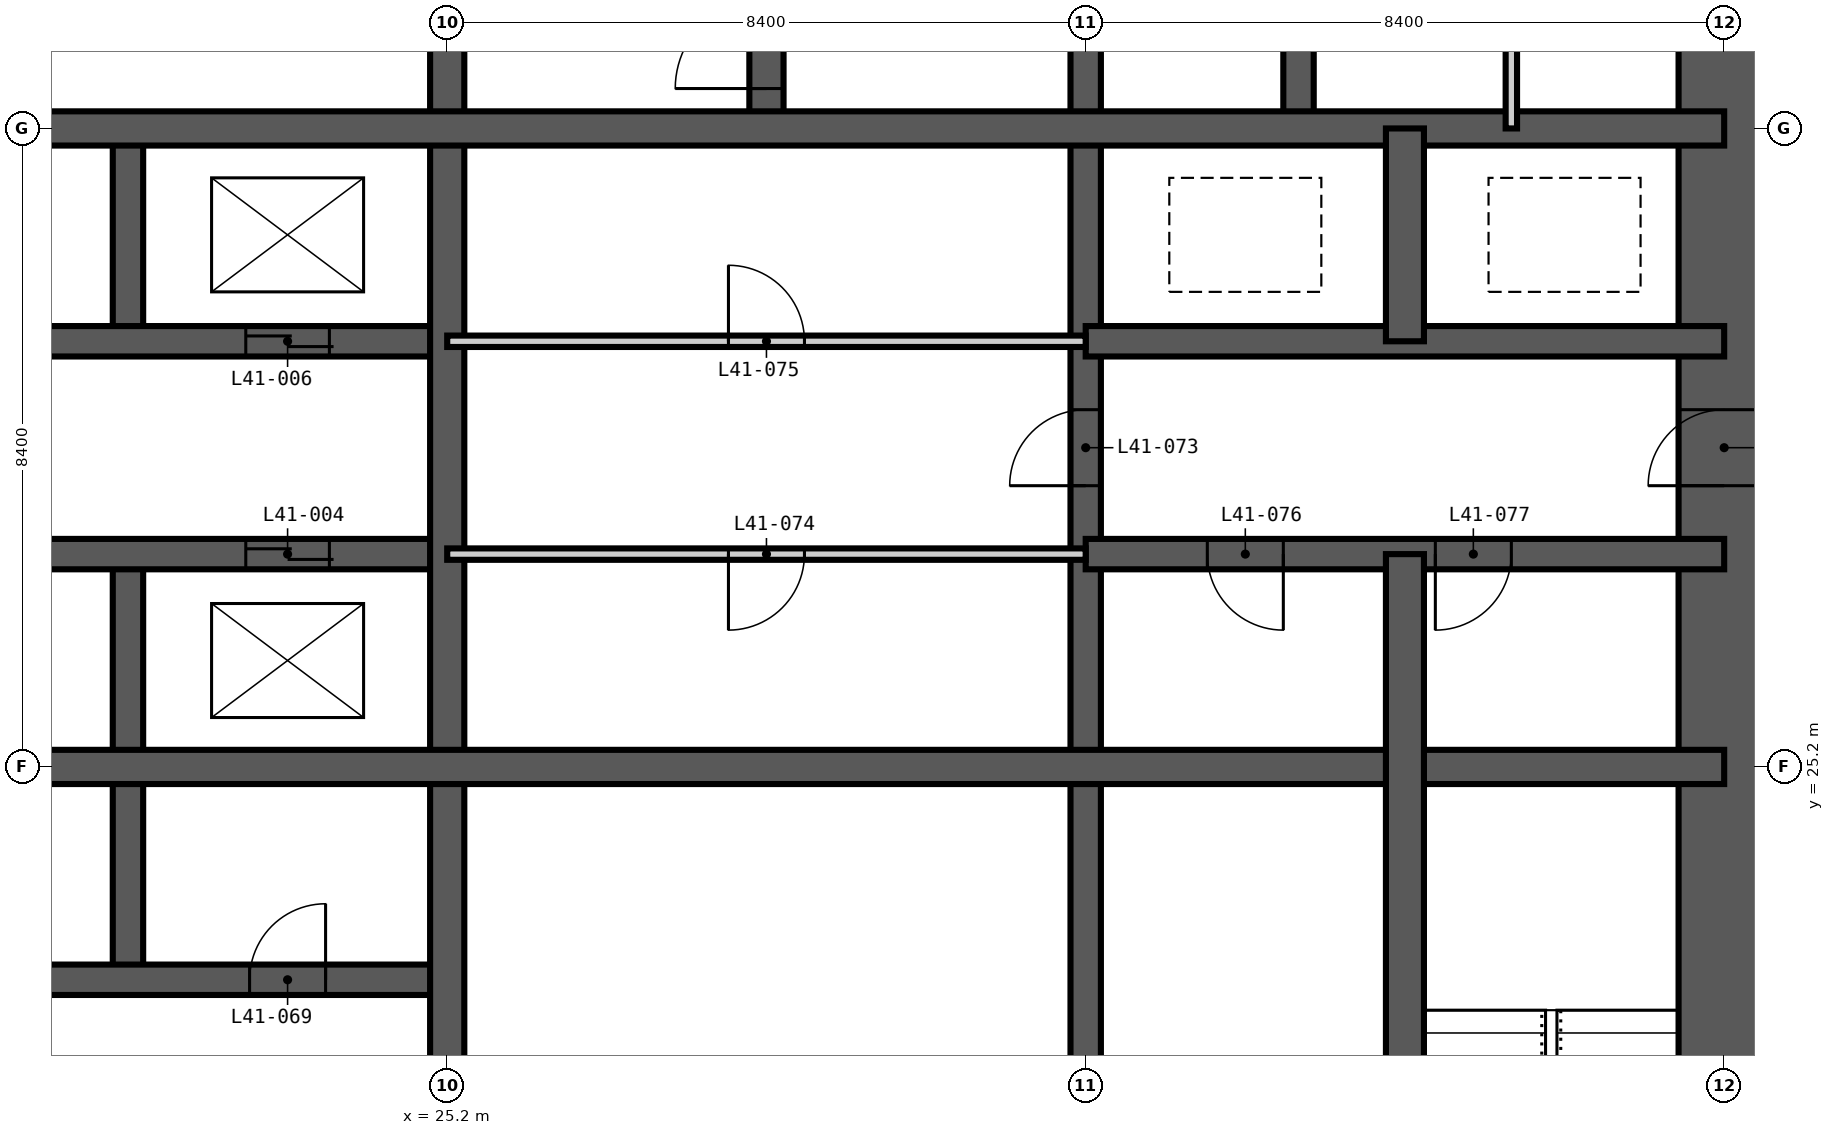
"""IFC4 building model, lengths in metres.
Left out: names, types, materials, properties, quantities, classifications, styles, units other than length and angle.
Written with IfcOpenShell. Run it as: python <this file> out.ifc"""

import sys

from ifc_helpers import new_model, si_unit, direction, frame, frame_2d, origin, place, context, subcontext, project, spatial, rectangle, extrude, element, fill, save


model = new_model("IFC4")
c1 = context("Model", 3, precision=1e-05, world=origin(), true_north=direction((0.0, 1.0)))
c2 = subcontext(c1, "Body", "Model", "MODEL_VIEW")
j1 = project(units=[si_unit("LENGTHUNIT", "METRE"), si_unit("PLANEANGLEUNIT", "RADIAN")], contexts=[c1])
p1 = place(None, origin())
s1 = spatial("IfcSite", under=j1, at=p1, CompositionType="ELEMENT")
p2 = place(p1, origin())
s2 = spatial("IfcBuilding", under=s1, at=p2, CompositionType="ELEMENT")
p3 = place(p2, frame((0.0, 0.0, 162.6)))
s3 = spatial("IfcBuildingStorey", under=s2, at=p3, CompositionType="ELEMENT", Elevation=162.6)
p4 = place(p3, frame((42.0, 17.4, -0.35), z_axis=(0.0, 0.0, 1.0), x_axis=(0.0, 1.0, 0.0)))
e1 = element("IfcWall", 1, at=p4, inside=s3, PredefinedType="SHEAR", context=c2, shape_type="SweptSolid", body=[
    extrude(rectangle(XDim=24.0, YDim=1.2, at=frame_2d((12.0, 0.0))), origin(), (0.0, 0.0, 1.0), 3.6),
])
p5 = place(p4, frame((0.2, 0.0, 0.35)))
e2 = element("IfcOpeningElement", 2, at=p5, cuts=e1, PredefinedType="OPENING", context=c2, shape_type="SweptSolid", body=[
    extrude(rectangle(XDim=1.2, YDim=2.2, at=frame_2d((0.6, 1.1))), frame((0.0, 0.61, 0.0), z_axis=(0.0, -1.0, 0.0), x_axis=(1.0, 0.0, 0.0)), (0.0, 0.0, 1.0), 1.22),
])
p6 = place(p4, frame((11.5, 0.0, 0.35)))
e3 = element("IfcOpeningElement", 3, at=p6, cuts=e1, PredefinedType="OPENING", context=c2, shape_type="SweptSolid", body=[
    extrude(rectangle(XDim=1.0, YDim=2.1, at=frame_2d((0.5, 1.05))), frame((0.0, 0.61, 0.0), z_axis=(0.0, -1.0, 0.0), x_axis=(1.0, 0.0, 0.0)), (0.0, 0.0, 1.0), 1.22),
])
p7 = place(p4, frame((19.9, 0.0, 0.35)))
e4 = element("IfcOpeningElement", 4, at=p7, cuts=e1, PredefinedType="OPENING", context=c2, shape_type="SweptSolid", body=[
    extrude(rectangle(XDim=1.0, YDim=2.1, at=frame_2d((0.5, 1.05))), frame((0.0, 0.61, 0.0), z_axis=(0.0, -1.0, 0.0), x_axis=(1.0, 0.0, 0.0)), (0.0, 0.0, 1.0), 1.22),
])
p8 = place(p3, frame((21.0, 22.4, -0.35), z_axis=(0.0, 0.0, 1.0), x_axis=(0.0, 1.0, 0.0)))
e5 = element("IfcWall", 5, at=p8, inside=s3, PredefinedType="SHEAR", context=c2, shape_type="SweptSolid", body=[
    extrude(rectangle(XDim=5.6, YDim=0.4, at=frame_2d((2.8, 0.0))), origin(), (0.0, 0.0, 1.0), 3.6),
])
p9 = place(p3, frame((21.0, 30.8, -0.35), z_axis=(0.0, 0.0, 1.0), x_axis=(0.0, 1.0, 0.0)))
e6 = element("IfcWall", 6, at=p9, inside=s3, PredefinedType="SHEAR", context=c2, shape_type="SweptSolid", body=[
    extrude(rectangle(XDim=2.8, YDim=0.4, at=frame_2d((1.4, 0.0))), origin(), (0.0, 0.0, 1.0), 3.6),
])
p10 = place(p3, frame((33.6, 16.8, -0.35), z_axis=(0.0, 0.0, 1.0), x_axis=(0.0, 1.0, 0.0)))
e7 = element("IfcWall", 7, at=p10, inside=s3, PredefinedType="SHEAR", context=c2, shape_type="SweptSolid", body=[
    extrude(rectangle(XDim=25.2, YDim=0.4, at=frame_2d((12.6, 0.0))), origin(), (0.0, 0.0, 1.0), 3.6),
])
p11 = place(p10, frame((22.5, 0.0, 0.35)))
e8 = element("IfcOpeningElement", 8, at=p11, cuts=e7, PredefinedType="OPENING", context=c2, shape_type="SweptSolid", body=[
    extrude(rectangle(XDim=1.2, YDim=2.2, at=frame_2d((0.6, 1.1))), frame((0.0, 0.21, 0.0), z_axis=(0.0, -1.0, 0.0), x_axis=(1.0, 0.0, 0.0)), (0.0, 0.0, 1.0), 0.42),
])
p12 = place(p10, frame((18.3, 0.0, 0.35)))
e9 = element("IfcOpeningElement", 9, at=p12, cuts=e7, PredefinedType="OPENING", context=c2, shape_type="SweptSolid", body=[
    extrude(rectangle(XDim=1.2, YDim=2.2, at=frame_2d((0.6, 1.1))), frame((0.0, 0.21, 0.0), z_axis=(0.0, -1.0, 0.0), x_axis=(1.0, 0.0, 0.0)), (0.0, 0.0, 1.0), 0.42),
])
p13 = place(p10, frame((12.1, 0.0, 0.35)))
e10 = element("IfcOpeningElement", 10, at=p13, cuts=e7, PredefinedType="OPENING", context=c2, shape_type="SweptSolid", body=[
    extrude(rectangle(XDim=1.0, YDim=2.1, at=frame_2d((0.5, 1.05))), frame((0.0, 0.21, 0.0), z_axis=(0.0, -1.0, 0.0), x_axis=(1.0, 0.0, 0.0)), (0.0, 0.0, 1.0), 0.42),
])
p14 = place(p3, frame((36.4, 33.6, -0.35), z_axis=(0.0, 0.0, 1.0), x_axis=(0.0, 1.0, 0.0)))
e11 = element("IfcWall", 11, at=p14, inside=s3, PredefinedType="SHEAR", context=c2, shape_type="SweptSolid", body=[
    extrude(rectangle(XDim=8.4, YDim=0.4, at=frame_2d((4.2, 0.0))), origin(), (0.0, 0.0, 1.0), 3.6),
])
p15 = place(p3, frame((16.8, 22.4, -0.35), z_axis=(0.0, 0.0, 1.0), x_axis=(1.0, 0.0, 0.0)))
e12 = element("IfcWall", 12, at=p15, inside=s3, PredefinedType="SHEAR", context=c2, shape_type="SweptSolid", body=[
    extrude(rectangle(XDim=8.4, YDim=0.4, at=frame_2d((4.2, 0.0))), origin(), (0.0, 0.0, 1.0), 3.6),
])
p16 = place(p15, frame((1.6, 0.0, 0.35)))
e13 = element("IfcOpeningElement", 13, at=p16, cuts=e12, PredefinedType="OPENING", context=c2, shape_type="SweptSolid", body=[
    extrude(rectangle(XDim=1.0, YDim=2.1, at=frame_2d((0.5, 1.05))), frame((0.0, 0.21, 0.0), z_axis=(0.0, -1.0, 0.0), x_axis=(1.0, 0.0, 0.0)), (0.0, 0.0, 1.0), 0.42),
])
p17 = place(p15, frame((5.8, 0.0, 0.35)))
e14 = element("IfcOpeningElement", 14, at=p17, cuts=e12, PredefinedType="OPENING", context=c2, shape_type="SweptSolid", body=[
    extrude(rectangle(XDim=1.0, YDim=2.1, at=frame_2d((0.5, 1.05))), frame((0.0, 0.21, 0.0), z_axis=(0.0, -1.0, 0.0), x_axis=(1.0, 0.0, 0.0)), (0.0, 0.0, 1.0), 0.42),
])
p18 = place(p3, frame((16.8, 28.0, -0.35), z_axis=(0.0, 0.0, 1.0), x_axis=(1.0, 0.0, 0.0)))
e15 = element("IfcWall", 15, at=p18, inside=s3, PredefinedType="SHEAR", context=c2, shape_type="SweptSolid", body=[
    extrude(rectangle(XDim=8.4, YDim=0.4, at=frame_2d((4.2, 0.0))), origin(), (0.0, 0.0, 1.0), 3.6),
])
p19 = place(p18, frame((1.55, 0.0, 0.35)))
e16 = element("IfcOpeningElement", 16, at=p19, cuts=e15, PredefinedType="OPENING", context=c2, shape_type="SweptSolid", body=[
    extrude(rectangle(XDim=1.1, YDim=2.2, at=frame_2d((0.55, 1.1))), frame((0.0, 0.21, 0.0), z_axis=(0.0, -1.0, 0.0), x_axis=(1.0, 0.0, 0.0)), (0.0, 0.0, 1.0), 0.42),
])
p20 = place(p18, frame((5.75, 0.0, 0.35)))
e17 = element("IfcOpeningElement", 17, at=p20, cuts=e15, PredefinedType="OPENING", context=c2, shape_type="SweptSolid", body=[
    extrude(rectangle(XDim=1.1, YDim=2.2, at=frame_2d((0.55, 1.1))), frame((0.0, 0.21, 0.0), z_axis=(0.0, -1.0, 0.0), x_axis=(1.0, 0.0, 0.0)), (0.0, 0.0, 1.0), 0.42),
])
p21 = place(p3, frame((33.6, 28.0, -0.35), z_axis=(0.0, 0.0, 1.0), x_axis=(1.0, 0.0, 0.0)))
e18 = element("IfcWall", 18, at=p21, inside=s3, PredefinedType="SHEAR", context=c2, shape_type="SweptSolid", body=[
    extrude(rectangle(XDim=8.4, YDim=0.4, at=frame_2d((4.2, 0.0))), origin(), (0.0, 0.0, 1.0), 3.6),
])
p22 = place(p21, frame((1.6, 0.0, 0.35)))
e19 = element("IfcOpeningElement", 19, at=p22, cuts=e18, PredefinedType="OPENING", context=c2, shape_type="SweptSolid", body=[
    extrude(rectangle(XDim=1.0, YDim=2.1, at=frame_2d((0.5, 1.05))), frame((0.0, 0.21, 0.0), z_axis=(0.0, -1.0, 0.0), x_axis=(1.0, 0.0, 0.0)), (0.0, 0.0, 1.0), 0.42),
])
p23 = place(p21, frame((4.6, 0.0, 0.35)))
e20 = element("IfcOpeningElement", 20, at=p23, cuts=e18, PredefinedType="OPENING", context=c2, shape_type="SweptSolid", body=[
    extrude(rectangle(XDim=1.0, YDim=2.1, at=frame_2d((0.5, 1.05))), frame((0.0, 0.21, 0.0), z_axis=(0.0, -1.0, 0.0), x_axis=(1.0, 0.0, 0.0)), (0.0, 0.0, 1.0), 0.42),
])
p24 = place(p3, frame((16.8, 30.8, -0.35), z_axis=(0.0, 0.0, 1.0), x_axis=(1.0, 0.0, 0.0)))
e21 = element("IfcWall", 21, at=p24, inside=s3, PredefinedType="SHEAR", context=c2, shape_type="SweptSolid", body=[
    extrude(rectangle(XDim=8.4, YDim=0.4, at=frame_2d((4.2, 0.0))), origin(), (0.0, 0.0, 1.0), 3.6),
])
p25 = place(p24, frame((1.55, 0.0, 0.35)))
e22 = element("IfcOpeningElement", 22, at=p25, cuts=e21, PredefinedType="OPENING", context=c2, shape_type="SweptSolid", body=[
    extrude(rectangle(XDim=1.1, YDim=2.2, at=frame_2d((0.55, 1.1))), frame((0.0, 0.21, 0.0), z_axis=(0.0, -1.0, 0.0), x_axis=(1.0, 0.0, 0.0)), (0.0, 0.0, 1.0), 0.42),
])
p26 = place(p24, frame((5.75, 0.0, 0.35)))
e23 = element("IfcOpeningElement", 23, at=p26, cuts=e21, PredefinedType="OPENING", context=c2, shape_type="SweptSolid", body=[
    extrude(rectangle(XDim=1.1, YDim=2.2, at=frame_2d((0.55, 1.1))), frame((0.0, 0.21, 0.0), z_axis=(0.0, -1.0, 0.0), x_axis=(1.0, 0.0, 0.0)), (0.0, 0.0, 1.0), 0.42),
])
p27 = place(p3, frame((33.6, 30.8, -0.35), z_axis=(0.0, 0.0, 1.0), x_axis=(1.0, 0.0, 0.0)))
e24 = element("IfcWall", 24, at=p27, inside=s3, PredefinedType="SHEAR", context=c2, shape_type="SweptSolid", body=[
    extrude(rectangle(XDim=8.4, YDim=0.4, at=frame_2d((4.2, 0.0))), origin(), (0.0, 0.0, 1.0), 3.6),
])
p28 = place(p3, frame((25.2, 16.8, -0.35), z_axis=(0.0, 0.0, 1.0), x_axis=(0.0, 1.0, 0.0)))
e25 = element("IfcWall", 25, at=p28, inside=s3, PredefinedType="SHEAR", context=c2, shape_type="SweptSolid", body=[
    extrude(rectangle(XDim=25.2, YDim=0.45, at=frame_2d((12.6, 0.0))), origin(), (0.0, 0.0, 1.0), 3.6),
])
p29 = place(p3, frame((29.4, 33.6, -0.35), z_axis=(0.0, 0.0, 1.0), x_axis=(0.0, 1.0, 0.0)))
e26 = element("IfcWall", 26, at=p29, inside=s3, PredefinedType="SHEAR", context=c2, shape_type="SweptSolid", body=[
    extrude(rectangle(XDim=8.4, YDim=0.45, at=frame_2d((4.2, 0.0))), origin(), (0.0, 0.0, 1.0), 3.6),
])
p30 = place(p29, frame((0.525, 0.0, 0.35)))
e27 = element("IfcOpeningElement", 27, at=p30, cuts=e26, PredefinedType="OPENING", context=c2, shape_type="SweptSolid", body=[
    extrude(rectangle(XDim=1.2, YDim=2.2, at=frame_2d((0.6, 1.1))), frame((0.0, 0.235, 0.0), z_axis=(0.0, -1.0, 0.0), x_axis=(1.0, 0.0, 0.0)), (0.0, 0.0, 1.0), 0.47),
])
for number, where, z_axis, x_axis in (
    (28, (16.8, 25.2, -0.35), (0.0, 0.0, 1.0), (1.0, 0.0, 0.0)),
    (29, (16.8, 33.6, -0.35), (0.0, 0.0, 1.0), (1.0, 0.0, 0.0)),
):
    element("IfcWall", number, at=place(p3, frame(where, z_axis=z_axis, x_axis=x_axis)), inside=s3, PredefinedType="SHEAR", context=c2, shape_type="SweptSolid", body=[
        extrude(rectangle(XDim=25.2, YDim=0.45, at=frame_2d((12.6, 0.0))), origin(), (0.0, 0.0, 1.0), 3.6),
    ])
p31 = place(p3, frame((37.8, 16.8, -0.35), z_axis=(0.0, 0.0, 1.0), x_axis=(0.0, 1.0, 0.0)))
e30 = element("IfcWall", 30, at=p31, inside=s3, PredefinedType="SHEAR", context=c2, shape_type="SweptSolid", body=[
    extrude(rectangle(XDim=11.2, YDim=0.5, at=frame_2d((5.6, 0.0))), origin(), (0.0, 0.0, 1.0), 3.6),
])
p32 = place(p3, frame((37.8, 30.8, -0.35), z_axis=(0.0, 0.0, 1.0), x_axis=(0.0, 1.0, 0.0)))
e31 = element("IfcWall", 31, at=p32, inside=s3, PredefinedType="SHEAR", context=c2, shape_type="SweptSolid", body=[
    extrude(rectangle(XDim=2.8, YDim=0.5, at=frame_2d((1.4, 0.0))), origin(), (0.0, 0.0, 1.0), 3.6),
])
p33 = place(p3, frame((39.2, 33.6, 0.0), z_axis=(0.0, 0.0, 1.0), x_axis=(0.0, 1.0, 0.0)))
e32 = element("IfcWall", 32, at=p33, inside=s3, PredefinedType="PARTITIONING", context=c2, shape_type="SweptSolid", body=[
    extrude(rectangle(XDim=8.4, YDim=0.15, at=frame_2d((4.2, 0.0))), origin(), (0.0, 0.0, 1.0), 3.25),
])
p34 = place(p33, frame((3.7, 0.0, 0.0)))
e33 = element("IfcOpeningElement", 33, at=p34, cuts=e32, PredefinedType="OPENING", context=c2, shape_type="SweptSolid", body=[
    extrude(rectangle(XDim=1.0, YDim=2.1, at=frame_2d((0.5, 1.05))), frame((0.0, 0.085, 0.0), z_axis=(0.0, -1.0, 0.0), x_axis=(1.0, 0.0, 0.0)), (0.0, 0.0, 1.0), 0.17),
])
p35 = place(p3, frame((25.2, 28.0, 0.0), z_axis=(0.0, 0.0, 1.0), x_axis=(1.0, 0.0, 0.0)))
e34 = element("IfcWall", 34, at=p35, inside=s3, PredefinedType="PARTITIONING", context=c2, shape_type="SweptSolid", body=[
    extrude(rectangle(XDim=8.4, YDim=0.15, at=frame_2d((4.2, 0.0))), origin(), (0.0, 0.0, 1.0), 3.25),
])
p36 = place(p35, frame((3.7, 0.0, 0.0)))
e35 = element("IfcOpeningElement", 35, at=p36, cuts=e34, PredefinedType="OPENING", context=c2, shape_type="SweptSolid", body=[
    extrude(rectangle(XDim=1.0, YDim=2.1, at=frame_2d((0.5, 1.05))), frame((0.0, 0.085, 0.0), z_axis=(0.0, -1.0, 0.0), x_axis=(1.0, 0.0, 0.0)), (0.0, 0.0, 1.0), 0.17),
])
p37 = place(p3, frame((25.2, 30.8, 0.0), z_axis=(0.0, 0.0, 1.0), x_axis=(1.0, 0.0, 0.0)))
e36 = element("IfcWall", 36, at=p37, inside=s3, PredefinedType="PARTITIONING", context=c2, shape_type="SweptSolid", body=[
    extrude(rectangle(XDim=8.4, YDim=0.15, at=frame_2d((4.2, 0.0))), origin(), (0.0, 0.0, 1.0), 3.25),
])
p38 = place(p37, frame((3.7, 0.0, 0.0)))
e37 = element("IfcOpeningElement", 37, at=p38, cuts=e36, PredefinedType="OPENING", context=c2, shape_type="SweptSolid", body=[
    extrude(rectangle(XDim=1.0, YDim=2.1, at=frame_2d((0.5, 1.05))), frame((0.0, 0.085, 0.0), z_axis=(0.0, -1.0, 0.0), x_axis=(1.0, 0.0, 0.0)), (0.0, 0.0, 1.0), 0.17),
])
p39 = place(p30, origin())
e38 = element("IfcDoor", 38, at=p39, inside=s3, OperationType="SINGLE_SWING_LEFT", PredefinedType="DOOR", context=c2, shape_type="SweptSolid", body=[
    extrude(rectangle(XDim=1.2, YDim=2.2, at=frame_2d((0.6, 1.1))), frame((0.0, 0.025, 0.0), z_axis=(0.0, -1.0, 0.0), x_axis=(1.0, 0.0, 0.0)), (0.0, 0.0, 1.0), 0.05),
])
fill(e27, e38)
p40 = place(p20, origin())
e39 = element("IfcDoor", 39, at=p40, inside=s3, OperationType="DOUBLE_DOOR_SLIDING", PredefinedType="DOOR", context=c2, shape_type="SweptSolid", body=[
    extrude(rectangle(XDim=1.1, YDim=2.2, at=frame_2d((0.55, 1.1))), frame((0.0, 0.025, 0.0), z_axis=(0.0, -1.0, 0.0), x_axis=(1.0, 0.0, 0.0)), (0.0, 0.0, 1.0), 0.05),
])
fill(e17, e39)
p41 = place(p26, origin())
e40 = element("IfcDoor", 40, at=p41, inside=s3, OperationType="DOUBLE_DOOR_SLIDING", PredefinedType="DOOR", context=c2, shape_type="SweptSolid", body=[
    extrude(rectangle(XDim=1.1, YDim=2.2, at=frame_2d((0.55, 1.1))), frame((0.0, 0.025, 0.0), z_axis=(0.0, -1.0, 0.0), x_axis=(1.0, 0.0, 0.0)), (0.0, 0.0, 1.0), 0.05),
])
fill(e23, e40)
p42 = place(p17, origin())
e41 = element("IfcDoor", 41, at=p42, inside=s3, OperationType="SINGLE_SWING_RIGHT", PredefinedType="DOOR", context=c2, shape_type="SweptSolid", body=[
    extrude(rectangle(XDim=1.0, YDim=2.1, at=frame_2d((0.5, 1.05))), frame((0.0, 0.025, 0.0), z_axis=(0.0, -1.0, 0.0), x_axis=(1.0, 0.0, 0.0)), (0.0, 0.0, 1.0), 0.05),
])
fill(e14, e41)
p43 = place(p13, origin())
e42 = element("IfcDoor", 42, at=p43, inside=s3, OperationType="SINGLE_SWING_LEFT", PredefinedType="DOOR", context=c2, shape_type="SweptSolid", body=[
    extrude(rectangle(XDim=1.0, YDim=2.1, at=frame_2d((0.5, 1.05))), frame((0.0, 0.025, 0.0), z_axis=(0.0, -1.0, 0.0), x_axis=(1.0, 0.0, 0.0)), (0.0, 0.0, 1.0), 0.05),
])
fill(e10, e42)
p44 = place(p36, frame((1.0, 0.0, 0.0), z_axis=(0.0, 0.0, 1.0), x_axis=(-1.0, 0.0, 0.0)))
e43 = element("IfcDoor", 43, at=p44, inside=s3, OperationType="SINGLE_SWING_RIGHT", PredefinedType="DOOR", context=c2, shape_type="SweptSolid", body=[
    extrude(rectangle(XDim=1.0, YDim=2.1, at=frame_2d((0.5, 1.05))), frame((0.0, 0.025, 0.0), z_axis=(0.0, -1.0, 0.0), x_axis=(1.0, 0.0, 0.0)), (0.0, 0.0, 1.0), 0.05),
])
fill(e35, e43)
p45 = place(p38, origin())
e44 = element("IfcDoor", 44, at=p45, inside=s3, OperationType="SINGLE_SWING_LEFT", PredefinedType="DOOR", context=c2, shape_type="SweptSolid", body=[
    extrude(rectangle(XDim=1.0, YDim=2.1, at=frame_2d((0.5, 1.05))), frame((0.0, 0.025, 0.0), z_axis=(0.0, -1.0, 0.0), x_axis=(1.0, 0.0, 0.0)), (0.0, 0.0, 1.0), 0.05),
])
fill(e37, e44)
p46 = place(p22, frame((1.0, 0.0, 0.0), z_axis=(0.0, 0.0, 1.0), x_axis=(-1.0, 0.0, 0.0)))
e45 = element("IfcDoor", 45, at=p46, inside=s3, OperationType="SINGLE_SWING_LEFT", PredefinedType="DOOR", context=c2, shape_type="SweptSolid", body=[
    extrude(rectangle(XDim=1.0, YDim=2.1, at=frame_2d((0.5, 1.05))), frame((0.0, 0.025, 0.0), z_axis=(0.0, -1.0, 0.0), x_axis=(1.0, 0.0, 0.0)), (0.0, 0.0, 1.0), 0.05),
])
fill(e19, e45)
p47 = place(p23, frame((1.0, 0.0, 0.0), z_axis=(0.0, 0.0, 1.0), x_axis=(-1.0, 0.0, 0.0)))
e46 = element("IfcDoor", 46, at=p47, inside=s3, OperationType="SINGLE_SWING_RIGHT", PredefinedType="DOOR", context=c2, shape_type="SweptSolid", body=[
    extrude(rectangle(XDim=1.0, YDim=2.1, at=frame_2d((0.5, 1.05))), frame((0.0, 0.025, 0.0), z_axis=(0.0, -1.0, 0.0), x_axis=(1.0, 0.0, 0.0)), (0.0, 0.0, 1.0), 0.05),
])
fill(e20, e46)
p48 = place(p6, origin())
e47 = element("IfcDoor", 47, at=p48, inside=s3, OperationType="SINGLE_SWING_LEFT", PredefinedType="DOOR", context=c2, shape_type="SweptSolid", body=[
    extrude(rectangle(XDim=1.0, YDim=2.1, at=frame_2d((0.5, 1.05))), frame((0.0, 0.025, 0.0), z_axis=(0.0, -1.0, 0.0), x_axis=(1.0, 0.0, 0.0)), (0.0, 0.0, 1.0), 0.05),
])
fill(e3, e47)
save(model, sys.argv[1])
